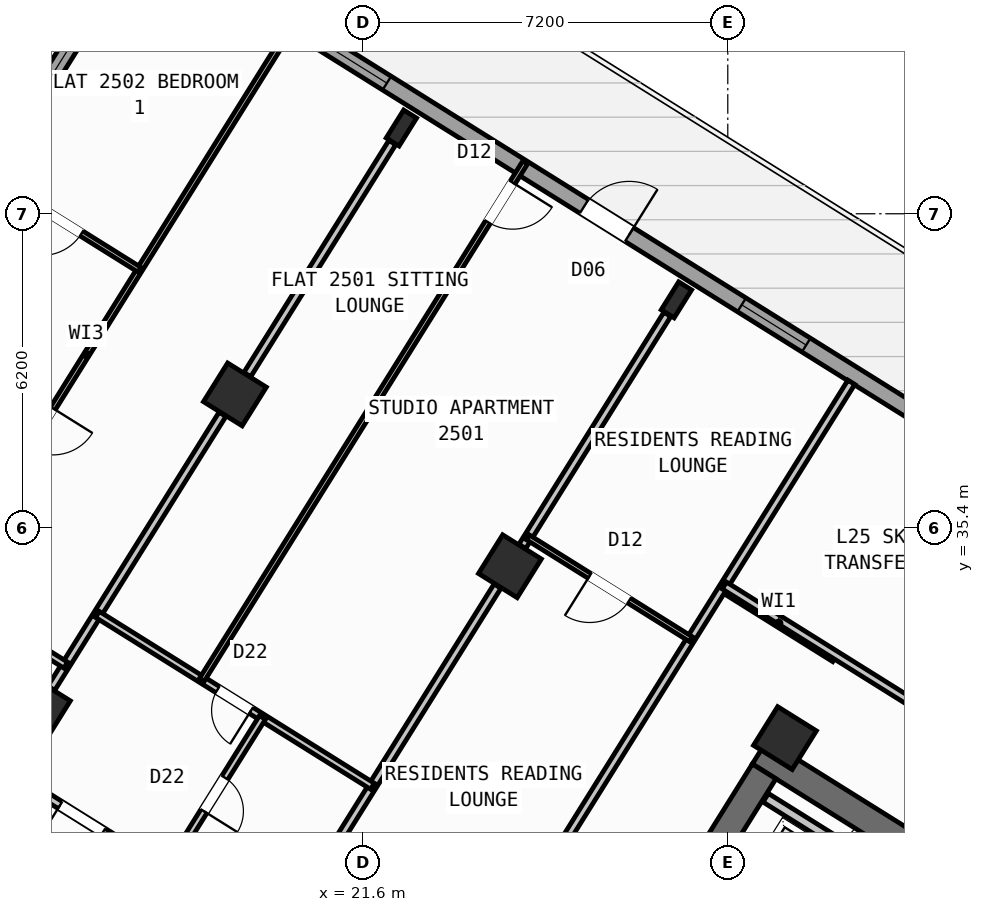
"""IFC4 building model, lengths in metres.
Left out: names, types, materials, properties, quantities, classifications, styles, units other than length and angle.
Written with IfcOpenShell. Run it as: python <this file> out.ifc"""

import sys

from ifc_helpers import new_model, si_unit, direction, frame, frame_2d, origin, origin_2d, place, context, subcontext, project, spatial, rectangle, hollow_rectangle, i_section, extrude, source, transform, mapped, element, fill, save


model = new_model("IFC4")
c1 = context("Model", 3, precision=1e-05, world=origin(), true_north=direction((0.0, 1.0)))
c2 = subcontext(c1, "Body", "Model", "MODEL_VIEW")
j1 = project(units=[si_unit("LENGTHUNIT", "METRE"), si_unit("PLANEANGLEUNIT", "RADIAN")], contexts=[c1])
p1 = place(None, origin())
s1 = spatial("IfcSite", under=j1, at=p1, CompositionType="ELEMENT")
p2 = place(p1, origin())
s2 = spatial("IfcBuilding", under=s1, at=p2, CompositionType="ELEMENT")
p3 = place(p2, frame((0.0, 0.0, 100.8)))
s3 = spatial("IfcBuildingStorey", under=s2, at=p3, CompositionType="ELEMENT", Elevation=100.8)
p4 = place(p3, frame((40.573, 24.01, 0.0), z_axis=(0.0, 0.0, 1.0), x_axis=(-0.848047359947, 0.529920442413, 0.0)))
e1 = element("IfcWall", 1, at=p4, inside=s3, PredefinedType="SHEAR", context=c2, shape_type="SweptSolid", body=[
    extrude(rectangle(XDim=13.14, YDim=0.55, at=frame_2d((6.57, 0.0))), origin(), (0.0, 0.0, 1.0), 4.25),
])
p5 = place(p3, frame((29.517, 30.594, 0.0), z_axis=(0.0, 0.0, 1.0), x_axis=(-0.529906864564, -0.848055844204, 0.0)))
e2 = element("IfcWall", 2, at=p5, inside=s3, PredefinedType="SHEAR", context=c2, shape_type="SweptSolid", body=[
    extrude(rectangle(XDim=3.575, YDim=0.55, at=frame_2d((1.788, 0.0))), origin(), (0.0, 0.0, 1.0), 4.25),
])
m1 = source(origin(), c2, "Body", "SweptSolid", [
    extrude(hollow_rectangle(XDim=0.9, YDim=0.9, WallThickness=0.036, at=origin_2d()), origin(), (0.0, 0.0, 1.0), 4.5),
])
p6 = place(p3, frame((29.928, 31.251, 0.0), z_axis=(0.0, 0.0, 1.0), x_axis=(-0.848048096156, 0.529919264233, 0.0)))
e3 = element("IfcColumn", 3, at=p6, inside=s3, PredefinedType="COLUMN", context=c2, shape_type="MappedRepresentation", body=[
    mapped(m1, transform((0.0, 0.0, 0.0), scale=1.0)),
])
m2 = source(origin(), c2, "Body", "SweptSolid", [
    extrude(i_section(OverallWidth=0.3, OverallDepth=0.65, WebThickness=0.016, FlangeThickness=0.031, at=origin_2d()), origin(), (0.0, 0.0, 1.0), 4.5),
])
p7 = place(p3, frame((27.786, 39.901, 0.0), z_axis=(0.0, 0.0, 1.0), x_axis=(-0.848048096156, 0.529919264233, 0.0)))
e4 = element("IfcColumn", 4, at=p7, inside=s3, PredefinedType="COLUMN", context=c2, shape_type="MappedRepresentation", body=[
    mapped(m2, transform((0.0, 0.0, 0.0), scale=1.0)),
])
p8 = place(p3, frame((24.5, 34.643, 0.0), z_axis=(0.0, 0.0, 1.0), x_axis=(-0.848048096156, 0.529919264233, 0.0)))
e5 = element("IfcColumn", 5, at=p8, inside=s3, PredefinedType="COLUMN", context=c2, shape_type="MappedRepresentation", body=[
    mapped(m1, transform((0.0, 0.0, 0.0), scale=1.0)),
])
p9 = place(p3, frame((22.358, 43.292, 0.0), z_axis=(0.0, 0.0, 1.0), x_axis=(-0.848048096156, 0.529919264233, 0.0)))
e6 = element("IfcColumn", 6, at=p9, inside=s3, PredefinedType="COLUMN", context=c2, shape_type="MappedRepresentation", body=[
    mapped(m2, transform((0.0, 0.0, 0.0), scale=1.0)),
])
for number, where, z_axis, x_axis in (
    (7, (19.073, 38.034, 0.0), (0.0, 0.0, 1.0), (-0.848, 0.53, 0.0)),
    (8, (15.205, 31.844, 0.0), (0.0, 0.0, 1.0), (-0.848, 0.53, 0.0)),
):
    element("IfcColumn", number, at=place(p3, frame(where, z_axis=z_axis, x_axis=x_axis)), inside=s3, PredefinedType="COLUMN", context=c2, shape_type="MappedRepresentation", body=[
        mapped(m1, transform((0.0, 0.0, 0.0), scale=1.0)),
    ])
p10 = place(p3, frame((5.7, 28.71, 0.0), z_axis=(0.0, 0.0, 1.0), x_axis=(0.529923711467, 0.8480453172, 0.0)))
e9 = element("IfcWall", 9, at=p10, inside=s3, PredefinedType="STANDARD", context=c2, shape_type="SweptSolid", body=[
    extrude(rectangle(XDim=21.587, YDim=0.32, at=frame_2d((10.794, 0.0))), origin(), (0.0, 0.0, 1.0), 3.675),
])
p11 = place(p10, frame((1.629, 0.0, 0.85)))
e10 = element("IfcOpeningElement", 10, at=p11, cuts=e9, PredefinedType="OPENING", context=c2, shape_type="SweptSolid", body=[
    extrude(rectangle(XDim=1.5, YDim=1.5, at=frame_2d((0.75, 0.75))), frame((0.0, 0.17, 0.0), z_axis=(0.0, -1.0, 0.0), x_axis=(1.0, 0.0, 0.0)), (0.0, 0.0, 1.0), 0.34),
])
p12 = place(p10, frame((10.654, 0.0, 0.8)))
e11 = element("IfcOpeningElement", 11, at=p12, cuts=e9, PredefinedType="OPENING", context=c2, shape_type="SweptSolid", body=[
    extrude(rectangle(XDim=2.1, YDim=1.55, at=frame_2d((1.05, 0.775))), frame((0.0, 0.17, 0.0), z_axis=(0.0, -1.0, 0.0), x_axis=(1.0, 0.0, 0.0)), (0.0, 0.0, 1.0), 0.34),
])
p13 = place(p10, frame((17.803, 0.0, 0.85)))
e12 = element("IfcOpeningElement", 12, at=p13, cuts=e9, PredefinedType="OPENING", context=c2, shape_type="SweptSolid", body=[
    extrude(rectangle(XDim=1.5, YDim=1.5, at=frame_2d((0.75, 0.75))), frame((0.0, 0.17, 0.0), z_axis=(0.0, -1.0, 0.0), x_axis=(1.0, 0.0, 0.0)), (0.0, 0.0, 1.0), 0.34),
])
p14 = place(p3, frame((17.424, 47.083, 0.0), z_axis=(0.0, 0.0, 1.0), x_axis=(0.848049927979, -0.529916332693, 0.0)))
e13 = element("IfcWall", 13, at=p14, inside=s3, PredefinedType="STANDARD", context=c2, shape_type="SweptSolid", body=[
    extrude(rectangle(XDim=29.223, YDim=0.32, at=frame_2d((14.612, 0.0))), origin(), (0.0, 0.0, 1.0), 4.25),
])
p15 = place(p14, frame((10.072, 0.0, 0.0)))
e14 = element("IfcOpeningElement", 14, at=p15, cuts=e13, PredefinedType="OPENING", context=c2, shape_type="SweptSolid", body=[
    extrude(rectangle(XDim=1.05, YDim=2.15, at=frame_2d((0.525, 1.075))), frame((0.0, 0.17, 0.0), z_axis=(0.0, -1.0, 0.0), x_axis=(1.0, 0.0, 0.0)), (0.0, 0.0, 1.0), 0.34),
])
p16 = place(p14, frame((0.869, 0.0, 0.85)))
e15 = element("IfcOpeningElement", 15, at=p16, cuts=e13, PredefinedType="OPENING", context=c2, shape_type="SweptSolid", body=[
    extrude(rectangle(XDim=1.5, YDim=1.5, at=frame_2d((0.75, 0.75))), frame((0.0, 0.17, 0.0), z_axis=(0.0, -1.0, 0.0), x_axis=(1.0, 0.0, 0.0)), (0.0, 0.0, 1.0), 0.34),
])
p17 = place(p14, frame((3.981, 0.0, 0.85)))
e16 = element("IfcOpeningElement", 16, at=p17, cuts=e13, PredefinedType="OPENING", context=c2, shape_type="SweptSolid", body=[
    extrude(rectangle(XDim=1.5, YDim=1.5, at=frame_2d((0.75, 0.75))), frame((0.0, 0.17, 0.0), z_axis=(0.0, -1.0, 0.0), x_axis=(1.0, 0.0, 0.0)), (0.0, 0.0, 1.0), 0.34),
])
p18 = place(p14, frame((13.739, 0.0, 0.85)))
e17 = element("IfcOpeningElement", 17, at=p18, cuts=e13, PredefinedType="OPENING", context=c2, shape_type="SweptSolid", body=[
    extrude(rectangle(XDim=1.5, YDim=1.5, at=frame_2d((0.75, 0.75))), frame((0.0, 0.17, 0.0), z_axis=(0.0, -1.0, 0.0), x_axis=(1.0, 0.0, 0.0)), (0.0, 0.0, 1.0), 0.34),
])
p19 = place(p14, frame((21.114, 0.0, 0.65)))
e18 = element("IfcOpeningElement", 18, at=p19, cuts=e13, PredefinedType="OPENING", context=c2, shape_type="SweptSolid", body=[
    extrude(rectangle(XDim=2.8, YDim=2.1, at=frame_2d((1.4, 1.05))), frame((0.0, 0.17, 0.0), z_axis=(0.0, -1.0, 0.0), x_axis=(1.0, 0.0, 0.0)), (0.0, 0.0, 1.0), 0.34),
])
p20 = place(p14, frame((26.784, 0.0, 0.85)))
e19 = element("IfcOpeningElement", 19, at=p20, cuts=e13, PredefinedType="OPENING", context=c2, shape_type="SweptSolid", body=[
    extrude(rectangle(XDim=1.5, YDim=1.5, at=frame_2d((0.75, 0.75))), frame((0.0, 0.17, 0.0), z_axis=(0.0, -1.0, 0.0), x_axis=(1.0, 0.0, 0.0)), (0.0, 0.0, 1.0), 0.34),
])
p21 = place(p3, frame((33.363, 27.69, 0.0), z_axis=(0.0, 0.0, 1.0), x_axis=(-0.848047090064, 0.529920874315, 0.0)))
e20 = element("IfcWall", 20, at=p21, inside=s3, PredefinedType="STANDARD", context=c2, shape_type="SweptSolid", body=[
    extrude(rectangle(XDim=4.498, YDim=0.2, at=frame_2d((2.249, 0.0))), origin(), (0.0, 0.0, 1.0), 4.24),
])
p22 = place(p3, frame((30.914, 32.829, 0.0), z_axis=(0.0, 0.0, 1.0), x_axis=(-0.848008813643, 0.529982124211, 0.0)))
e21 = element("IfcWall", 21, at=p22, inside=s3, PredefinedType="PARTITIONING", context=c2, shape_type="SweptSolid", body=[
    extrude(rectangle(XDim=2.61, YDim=0.16, at=frame_2d((1.305, 0.0))), origin(), (0.0, 0.0, 1.0), 4.24),
])
p23 = place(p3, frame((31.239, 38.274, 0.0), z_axis=(0.0, 0.0, 1.0), x_axis=(-0.529918877109, -0.848048338059, 0.0)))
e22 = element("IfcWall", 22, at=p23, inside=s3, PredefinedType="PARTITIONING", context=c2, shape_type="SweptSolid", body=[
    extrude(rectangle(XDim=15.35, YDim=0.16, at=frame_2d((7.675, 0.0))), origin(), (0.0, 0.0, 1.0), 4.24),
])
p24 = place(p3, frame((23.104, 25.256, 0.0), z_axis=(0.0, 0.0, 1.0), x_axis=(-0.848041752158, 0.529929416617, 0.0)))
e23 = element("IfcWall", 23, at=p24, inside=s3, PredefinedType="PARTITIONING", context=c2, shape_type="SweptSolid", body=[
    extrude(rectangle(XDim=16.73, YDim=0.16, at=frame_2d((8.365, 0.0))), origin(), (0.0, 0.0, 1.0), 4.24),
])
p25 = place(p24, frame((1.395, 0.0, 0.0)))
e24 = element("IfcOpeningElement", 24, at=p25, cuts=e23, PredefinedType="OPENING", context=c2, shape_type="SweptSolid", body=[
    extrude(rectangle(XDim=1.0, YDim=2.1, at=frame_2d((0.5, 1.05))), frame((0.0, 0.09, 0.0), z_axis=(0.0, -1.0, 0.0), x_axis=(1.0, 0.0, 0.0)), (0.0, 0.0, 1.0), 0.18),
])
p26 = place(p24, frame((7.82, 0.0, 0.0)))
e25 = element("IfcOpeningElement", 25, at=p26, cuts=e23, PredefinedType="OPENING", context=c2, shape_type="SweptSolid", body=[
    extrude(rectangle(XDim=1.0, YDim=2.1, at=frame_2d((0.5, 1.05))), frame((0.0, 0.09, 0.0), z_axis=(0.0, -1.0, 0.0), x_axis=(1.0, 0.0, 0.0)), (0.0, 0.0, 1.0), 0.18),
])
p27 = place(p24, frame((11.14, 0.0, 0.0)))
e26 = element("IfcOpeningElement", 26, at=p27, cuts=e23, PredefinedType="OPENING", context=c2, shape_type="SweptSolid", body=[
    extrude(rectangle(XDim=1.0, YDim=2.1, at=frame_2d((0.5, 1.05))), frame((0.0, 0.09, 0.0), z_axis=(0.0, -1.0, 0.0), x_axis=(1.0, 0.0, 0.0)), (0.0, 0.0, 1.0), 0.18),
])
p28 = place(p3, frame((21.938, 23.391, 0.0), z_axis=(0.0, 0.0, 1.0), x_axis=(-0.848045850158, 0.529922858565, 0.0)))
e27 = element("IfcWall", 27, at=p28, inside=s3, PredefinedType="PARTITIONING", context=c2, shape_type="SweptSolid", body=[
    extrude(rectangle(XDim=16.73, YDim=0.16, at=frame_2d((8.365, 0.0))), origin(), (0.0, 0.0, 1.0), 4.24),
])
p29 = place(p28, frame((1.505, 0.0, 0.0)))
e28 = element("IfcOpeningElement", 28, at=p29, cuts=e27, PredefinedType="OPENING", context=c2, shape_type="SweptSolid", body=[
    extrude(rectangle(XDim=1.0, YDim=2.1, at=frame_2d((0.5, 1.05))), frame((0.0, 0.09, 0.0), z_axis=(0.0, -1.0, 0.0), x_axis=(1.0, 0.0, 0.0)), (0.0, 0.0, 1.0), 0.18),
])
p30 = place(p28, frame((6.435, 0.0, 0.0)))
e29 = element("IfcOpeningElement", 29, at=p30, cuts=e27, PredefinedType="OPENING", context=c2, shape_type="SweptSolid", body=[
    extrude(rectangle(XDim=1.0, YDim=2.1, at=frame_2d((0.5, 1.05))), frame((0.0, 0.09, 0.0), z_axis=(0.0, -1.0, 0.0), x_axis=(1.0, 0.0, 0.0)), (0.0, 0.0, 1.0), 0.18),
])
p31 = place(p28, frame((12.784, 0.0, 0.0)))
e30 = element("IfcOpeningElement", 30, at=p31, cuts=e27, PredefinedType="OPENING", context=c2, shape_type="SweptSolid", body=[
    extrude(rectangle(XDim=1.0, YDim=2.1, at=frame_2d((0.5, 1.05))), frame((0.0, 0.09, 0.0), z_axis=(0.0, -1.0, 0.0), x_axis=(1.0, 0.0, 0.0)), (0.0, 0.0, 1.0), 0.18),
])
p32 = place(p3, frame((27.607, 39.615, 0.0), z_axis=(0.0, 0.0, 1.0), x_axis=(-0.529913610495, -0.848051628978, 0.0)))
e31 = element("IfcWall", 31, at=p32, inside=s3, PredefinedType="PARTITIONING", context=c2, shape_type="SweptSolid", body=[
    extrude(rectangle(XDim=5.401, YDim=0.16, at=frame_2d((2.7, 0.0))), origin(), (0.0, 0.0, 1.0), 3.675),
])
p33 = place(p3, frame((24.256, 34.251, 0.0), z_axis=(0.0, 0.0, 1.0), x_axis=(-0.529919772691, -0.848047778437, 0.0)))
e32 = element("IfcWall", 32, at=p33, inside=s3, PredefinedType="PARTITIONING", context=c2, shape_type="SweptSolid", body=[
    extrude(rectangle(XDim=6.376, YDim=0.16, at=frame_2d((3.188, 0.0))), origin(), (0.0, 0.0, 1.0), 3.675),
])
p34 = place(p3, frame((28.071, 33.204, 0.0), z_axis=(0.0, 0.0, 1.0), x_axis=(-0.848059820872, 0.529900500304, 0.0)))
e33 = element("IfcWall", 33, at=p34, inside=s3, PredefinedType="PARTITIONING", context=c2, shape_type="SweptSolid", body=[
    extrude(rectangle(XDim=3.79, YDim=0.11, at=frame_2d((1.895, 0.0))), origin(), (0.0, 0.0, 1.0), 4.24),
])
p35 = place(p34, frame((1.435, 0.0, 0.0)))
e34 = element("IfcOpeningElement", 34, at=p35, cuts=e33, PredefinedType="OPENING", context=c2, shape_type="SweptSolid", body=[
    extrude(rectangle(XDim=0.92, YDim=2.08, at=frame_2d((0.46, 1.04))), frame((0.0, 0.065, 0.0), z_axis=(0.0, -1.0, 0.0), x_axis=(1.0, 0.0, 0.0)), (0.0, 0.0, 1.0), 0.13),
])
p36 = place(p3, frame((22.18, 43.006, 0.0), z_axis=(0.0, 0.0, 1.0), x_axis=(-0.529913610495, -0.848051628978, 0.0)))
e35 = element("IfcWall", 35, at=p36, inside=s3, PredefinedType="PARTITIONING", context=c2, shape_type="SweptSolid", body=[
    extrude(rectangle(XDim=5.401, YDim=0.16, at=frame_2d((2.7, 0.0))), origin(), (0.0, 0.0, 1.0), 3.675),
])
p37 = place(p3, frame((18.828, 37.643, 0.0), z_axis=(0.0, 0.0, 1.0), x_axis=(-0.529930102756, -0.848041323399, 0.0)))
e36 = element("IfcWall", 36, at=p37, inside=s3, PredefinedType="PARTITIONING", context=c2, shape_type="SweptSolid", body=[
    extrude(rectangle(XDim=6.376, YDim=0.16, at=frame_2d((3.188, 0.0))), origin(), (0.0, 0.0, 1.0), 3.675),
])
p38 = place(p3, frame((21.787, 30.301, 0.0), z_axis=(0.0, 0.0, 1.0), x_axis=(-0.848049732085, 0.529916646191, 0.0)))
e37 = element("IfcWall", 37, at=p38, inside=s3, PredefinedType="PLUMBINGWALL", context=c2, shape_type="SweptSolid", body=[
    extrude(rectangle(XDim=6.4, YDim=0.14, at=frame_2d((3.2, 0.0))), origin(), (0.0, 0.0, 1.0), 4.24),
])
p39 = place(p38, frame((2.824, 0.0, 0.0)))
e38 = element("IfcOpeningElement", 38, at=p39, cuts=e37, PredefinedType="OPENING", context=c2, shape_type="SweptSolid", body=[
    extrude(rectangle(XDim=0.78, YDim=2.05, at=frame_2d((0.39, 1.025))), frame((0.0, 0.08, 0.0), z_axis=(0.0, -1.0, 0.0), x_axis=(1.0, 0.0, 0.0)), (0.0, 0.0, 1.0), 0.16),
])
p40 = place(p3, frame((19.616, 31.657, 0.0), z_axis=(0.0, 0.0, 1.0), x_axis=(-0.529876336437, -0.84807491891, 0.0)))
e39 = element("IfcWall", 39, at=p40, inside=s3, PredefinedType="PLUMBINGWALL", context=c2, shape_type="SweptSolid", body=[
    extrude(rectangle(XDim=3.58, YDim=0.14, at=frame_2d((1.79, 0.0))), origin(), (0.0, 0.0, 1.0), 4.24),
])
p41 = place(p40, frame((1.4, 0.0, 0.0)))
e40 = element("IfcOpeningElement", 40, at=p41, cuts=e39, PredefinedType="OPENING", context=c2, shape_type="SweptSolid", body=[
    extrude(rectangle(XDim=0.78, YDim=2.05, at=frame_2d((0.39, 1.025))), frame((0.0, 0.08, 0.0), z_axis=(0.0, -1.0, 0.0), x_axis=(1.0, 0.0, 0.0)), (0.0, 0.0, 1.0), 0.16),
])
p42 = place(p3, frame((24.802, 42.614, 0.0), z_axis=(0.0, 0.0, 1.0), x_axis=(-0.529929676091, -0.848041590017, 0.0)))
e41 = element("IfcWall", 41, at=p42, inside=s3, PredefinedType="PARTITIONING", context=c2, shape_type="SweptSolid", body=[
    extrude(rectangle(XDim=12.04, YDim=0.11, at=frame_2d((6.02, 0.0))), origin(), (0.0, 0.0, 1.0), 4.24),
])
p43 = place(p42, frame((0.47, 0.0, 0.0)))
e42 = element("IfcOpeningElement", 42, at=p43, cuts=e41, PredefinedType="OPENING", context=c2, shape_type="SweptSolid", body=[
    extrude(rectangle(XDim=0.92, YDim=2.08, at=frame_2d((0.46, 1.04))), frame((0.0, 0.065, 0.0), z_axis=(0.0, -1.0, 0.0), x_axis=(1.0, 0.0, 0.0)), (0.0, 0.0, 1.0), 0.13),
])
p44 = place(p3, frame((20.281, 45.44, 0.0), z_axis=(0.0, 0.0, 1.0), x_axis=(-0.529917451133, -0.848049229105, 0.0)))
e43 = element("IfcWall", 43, at=p44, inside=s3, PredefinedType="PARTITIONING", context=c2, shape_type="SweptSolid", body=[
    extrude(rectangle(XDim=15.62, YDim=0.11, at=frame_2d((7.81, 0.0))), origin(), (0.0, 0.0, 1.0), 4.24),
])
p45 = place(p44, frame((13.98, 0.0, 0.0)))
e44 = element("IfcOpeningElement", 44, at=p45, cuts=e43, PredefinedType="OPENING", context=c2, shape_type="SweptSolid", body=[
    extrude(rectangle(XDim=0.78, YDim=2.05, at=frame_2d((0.39, 1.025))), frame((0.0, 0.065, 0.0), z_axis=(0.0, -1.0, 0.0), x_axis=(1.0, 0.0, 0.0)), (0.0, 0.0, 1.0), 0.13),
])
p46 = place(p44, frame((9.055, 0.0, 0.0)))
e45 = element("IfcOpeningElement", 45, at=p46, cuts=e43, PredefinedType="OPENING", context=c2, shape_type="SweptSolid", body=[
    extrude(rectangle(XDim=0.92, YDim=2.08, at=frame_2d((0.46, 1.04))), frame((0.0, 0.065, 0.0), z_axis=(0.0, -1.0, 0.0), x_axis=(1.0, 0.0, 0.0)), (0.0, 0.0, 1.0), 0.13),
])
p47 = place(p3, frame((15.734, 32.692, 0.0), z_axis=(0.0, 0.0, 1.0), x_axis=(-0.848059786386, 0.529900555496, 0.0)))
e46 = element("IfcWall", 46, at=p47, inside=s3, PredefinedType="PLUMBINGWALL", context=c2, shape_type="SweptSolid", body=[
    extrude(rectangle(XDim=2.9, YDim=0.14, at=frame_2d((1.45, 0.0))), origin(), (0.0, 0.0, 1.0), 4.24),
])
p48 = place(p47, frame((0.99, 0.0, 0.0)))
e47 = element("IfcOpeningElement", 47, at=p48, cuts=e46, PredefinedType="OPENING", context=c2, shape_type="SweptSolid", body=[
    extrude(rectangle(XDim=0.92, YDim=2.08, at=frame_2d((0.46, 1.04))), frame((0.0, 0.08, 0.0), z_axis=(0.0, -1.0, 0.0), x_axis=(1.0, 0.0, 0.0)), (0.0, 0.0, 1.0), 0.16),
])
p49 = place(p3, frame((17.191, 40.495, 0.0), z_axis=(0.0, 0.0, 1.0), x_axis=(-0.848051346257, 0.52991406295, 0.0)))
e48 = element("IfcWall", 48, at=p49, inside=s3, PredefinedType="PARTITIONING", context=c2, shape_type="SweptSolid", body=[
    extrude(rectangle(XDim=3.62, YDim=0.11, at=frame_2d((1.81, 0.0))), origin(), (0.0, 0.0, 1.0), 4.24),
])
p50 = place(p49, frame((1.35, 0.0, 0.0)))
e49 = element("IfcOpeningElement", 49, at=p50, cuts=e48, PredefinedType="OPENING", context=c2, shape_type="SweptSolid", body=[
    extrude(rectangle(XDim=0.92, YDim=2.08, at=frame_2d((0.46, 1.04))), frame((0.0, 0.065, 0.0), z_axis=(0.0, -1.0, 0.0), x_axis=(1.0, 0.0, 0.0)), (0.0, 0.0, 1.0), 0.13),
])
p51 = place(p3, frame((41.936, 26.012, 0.0), z_axis=(0.0, 0.0, 1.0), x_axis=(-0.848051154596, 0.529914369676, 0.0)))
e50 = element("IfcWall", 50, at=p51, inside=s3, PredefinedType="PARTITIONING", context=c2, shape_type="SweptSolid", body=[
    extrude(rectangle(XDim=15.57, YDim=0.16, at=frame_2d((7.785, 0.0))), origin(), (0.0, 0.0, 1.0), 4.24),
])
p52 = place(p51, frame((4.1, 0.0, 0.0)))
e51 = element("IfcOpeningElement", 51, at=p52, cuts=e50, PredefinedType="OPENING", context=c2, shape_type="SweptSolid", body=[
    extrude(rectangle(XDim=0.96, YDim=2.08, at=frame_2d((0.48, 1.04))), frame((0.0, 0.09, 0.0), z_axis=(0.0, -1.0, 0.0), x_axis=(1.0, 0.0, 0.0)), (0.0, 0.0, 1.0), 0.18),
])
p53 = place(p51, frame((8.2, 0.0, 0.0)))
e52 = element("IfcOpeningElement", 52, at=p53, cuts=e50, PredefinedType="OPENING", context=c2, shape_type="SweptSolid", body=[
    extrude(rectangle(XDim=1.7, YDim=2.2, at=frame_2d((0.85, 1.1))), frame((0.0, 0.09, 0.0), z_axis=(0.0, -1.0, 0.0), x_axis=(1.0, 0.0, 0.0)), (0.0, 0.0, 1.0), 0.18),
])
m3 = source(origin(), c2, "Body", "SweptSolid", [
    extrude(rectangle(XDim=1.05, YDim=2.15, at=frame_2d((0.525, 1.075))), frame((0.0, 0.025, 0.0), z_axis=(0.0, -1.0, 0.0), x_axis=(1.0, 0.0, 0.0)), (0.0, 0.0, 1.0), 0.05),
])
p54 = place(p15, origin())
e53 = element("IfcDoor", 53, at=p54, inside=s3, OperationType="SINGLE_SWING_RIGHT", PredefinedType="DOOR", context=c2, shape_type="MappedRepresentation", body=[
    mapped(m3, transform((0.0, 0.0, 0.0), scale=1.0)),
])
fill(e14, e53)
m4 = source(origin(), c2, "Body", "SweptSolid", [
    extrude(rectangle(XDim=1.5, YDim=1.5, at=frame_2d((0.75, 0.75))), frame((0.0, 0.03, 0.0), z_axis=(0.0, -1.0, 0.0), x_axis=(1.0, 0.0, 0.0)), (0.0, 0.0, 1.0), 0.06),
])
p55 = place(p13, origin())
e54 = element("IfcWindow", 54, at=p55, inside=s3, PartitioningType="SINGLE_PANEL", PredefinedType="WINDOW", context=c2, shape_type="MappedRepresentation", body=[
    mapped(m4, transform((0.0, 0.0, 0.0), scale=1.0)),
])
fill(e12, e54)
p56 = place(p17, origin())
e55 = element("IfcWindow", 55, at=p56, inside=s3, PartitioningType="SINGLE_PANEL", PredefinedType="WINDOW", context=c2, shape_type="MappedRepresentation", body=[
    mapped(m4, transform((0.0, 0.0, 0.0), scale=1.0)),
])
fill(e16, e55)
p57 = place(p18, origin())
e56 = element("IfcWindow", 56, at=p57, inside=s3, PartitioningType="SINGLE_PANEL", PredefinedType="WINDOW", context=c2, shape_type="MappedRepresentation", body=[
    mapped(m4, transform((0.0, 0.0, 0.0), scale=1.0)),
])
fill(e17, e56)
m5 = source(origin(), c2, "Body", "SweptSolid", [
    extrude(rectangle(XDim=0.92, YDim=2.08, at=frame_2d((0.46, 1.04))), frame((0.0, 0.025, 0.0), z_axis=(0.0, -1.0, 0.0), x_axis=(1.0, 0.0, 0.0)), (0.0, 0.0, 1.0), 0.05),
])
p58 = place(p35, origin())
e57 = element("IfcDoor", 57, at=p58, inside=s3, OperationType="SINGLE_SWING_RIGHT", PredefinedType="DOOR", context=c2, shape_type="MappedRepresentation", body=[
    mapped(m5, transform((0.0, 0.0, 0.0), scale=1.0)),
])
fill(e34, e57)
p59 = place(p43, origin())
e58 = element("IfcDoor", 58, at=p59, inside=s3, OperationType="SINGLE_SWING_LEFT", PredefinedType="DOOR", context=c2, shape_type="MappedRepresentation", body=[
    mapped(m5, transform((0.0, 0.0, 0.0), scale=1.0)),
])
fill(e42, e58)
m6 = source(origin(), c2, "Body", "SweptSolid", [
    extrude(rectangle(XDim=1.0, YDim=2.1, at=frame_2d((0.5, 1.05))), frame((0.0, 0.025, 0.0), z_axis=(0.0, -1.0, 0.0), x_axis=(1.0, 0.0, 0.0)), (0.0, 0.0, 1.0), 0.05),
])
p60 = place(p26, origin())
e59 = element("IfcDoor", 59, at=p60, inside=s3, OperationType="SINGLE_SWING_RIGHT", PredefinedType="DOOR", context=c2, shape_type="MappedRepresentation", body=[
    mapped(m6, transform((0.0, 0.0, 0.0), scale=1.0)),
])
fill(e25, e59)
m7 = source(origin(), c2, "Body", "SweptSolid", [
    extrude(rectangle(XDim=0.78, YDim=2.05, at=frame_2d((0.39, 1.025))), frame((0.0, 0.025, 0.0), z_axis=(0.0, -1.0, 0.0), x_axis=(1.0, 0.0, 0.0)), (0.0, 0.0, 1.0), 0.05),
])
p61 = place(p39, origin())
e60 = element("IfcDoor", 60, at=p61, inside=s3, OperationType="SINGLE_SWING_LEFT", PredefinedType="DOOR", context=c2, shape_type="MappedRepresentation", body=[
    mapped(m7, transform((0.0, 0.0, 0.0), scale=1.0)),
])
fill(e38, e60)
p62 = place(p41, origin())
e61 = element("IfcDoor", 61, at=p62, inside=s3, OperationType="SINGLE_SWING_RIGHT", PredefinedType="DOOR", context=c2, shape_type="MappedRepresentation", body=[
    mapped(m7, transform((0.0, 0.0, 0.0), scale=1.0)),
])
fill(e40, e61)
p63 = place(p46, origin())
e62 = element("IfcDoor", 62, at=p63, inside=s3, OperationType="SINGLE_SWING_LEFT", PredefinedType="DOOR", context=c2, shape_type="MappedRepresentation", body=[
    mapped(m5, transform((0.0, 0.0, 0.0), scale=1.0)),
])
fill(e45, e62)
p64 = place(p50, origin())
e63 = element("IfcDoor", 63, at=p64, inside=s3, OperationType="SINGLE_SWING_RIGHT", PredefinedType="DOOR", context=c2, shape_type="MappedRepresentation", body=[
    mapped(m5, transform((0.0, 0.0, 0.0), scale=1.0)),
])
fill(e49, e63)
save(model, sys.argv[1])
